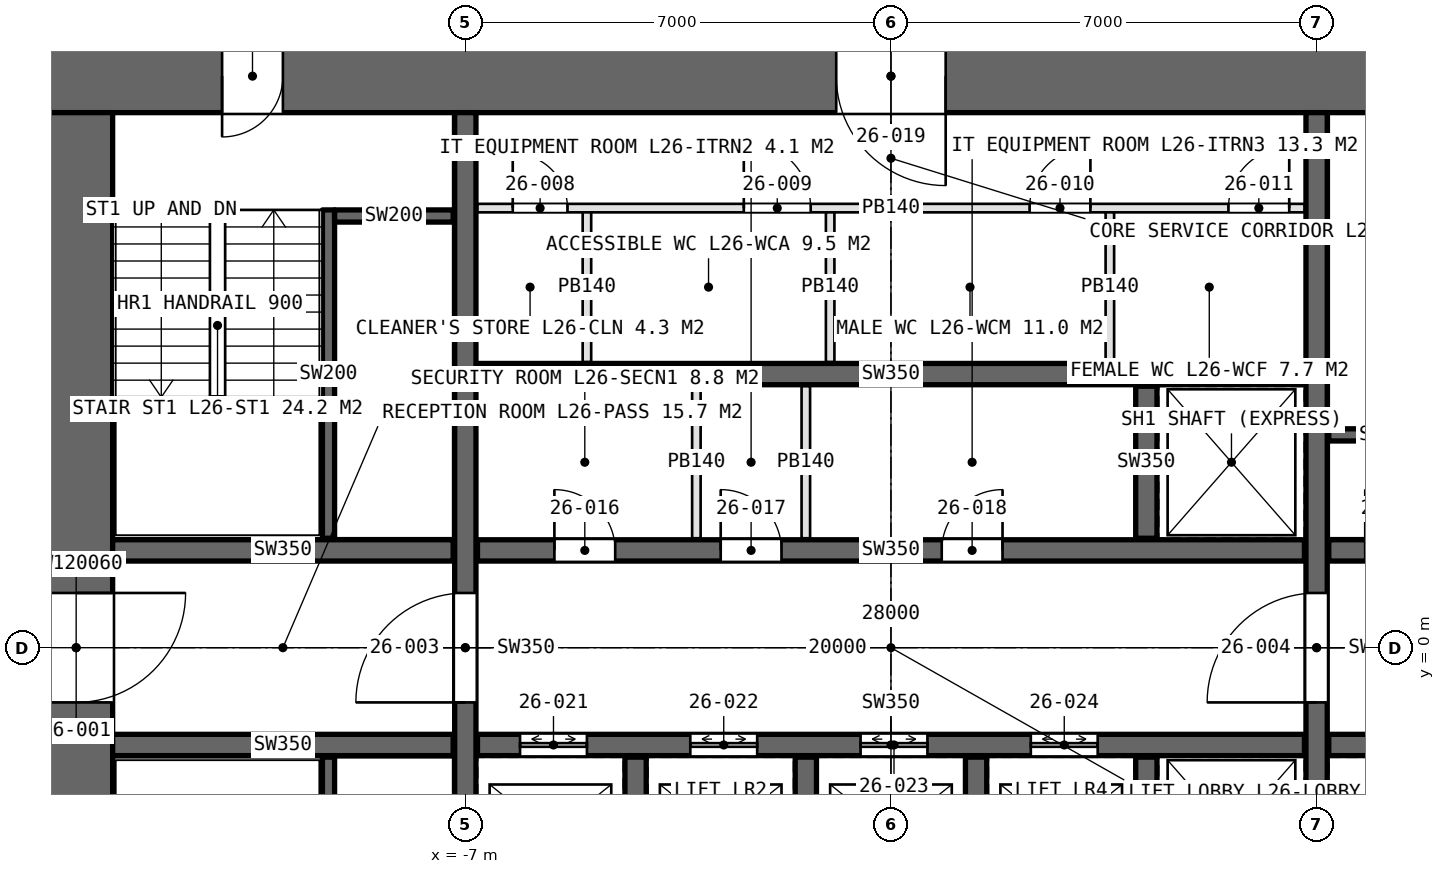
"""IFC4 building model, lengths in metres.
Left out: names, types, materials, properties, quantities, classifications, styles, units other than length and angle.
Written with IfcOpenShell. Run it as: python <this file> out.ifc"""

import sys

from ifc_helpers import new_model, si_unit, direction, frame, frame_2d, origin, place, context, subcontext, project, spatial, rectangle, extrude, element, fill, save


model = new_model("IFC4")
c1 = context("Model", 3, precision=1e-05, world=origin(), true_north=direction((0.0, 1.0)))
c2 = subcontext(c1, "Body", "Model", "MODEL_VIEW")
j1 = project(units=[si_unit("LENGTHUNIT", "METRE"), si_unit("PLANEANGLEUNIT", "RADIAN")], contexts=[c1])
p1 = place(None, origin())
s1 = spatial("IfcSite", under=j1, at=p1, CompositionType="ELEMENT")
p2 = place(p1, origin())
s2 = spatial("IfcBuilding", under=s1, at=p2, CompositionType="ELEMENT")
p3 = place(p2, frame((0.0, 0.0, 126.0)))
s3 = spatial("IfcBuildingStorey", under=s2, at=p3, CompositionType="ELEMENT", Elevation=126.0)
p4 = place(p3, frame((14.0, 9.4, 0.0), z_axis=(0.0, 0.0, 1.0), x_axis=(-1.0, 0.0, 0.0)))
e1 = element("IfcWall", 1, at=p4, inside=s3, PredefinedType="SHEAR", context=c2, shape_type="SweptSolid", body=[
    extrude(rectangle(XDim=28.0, YDim=1.2, at=frame_2d((14.0, 0.0))), origin(), (0.0, 0.0, 1.0), 4.2),
])
p5 = place(p4, frame((24.0, 0.0, 0.0)))
e2 = element("IfcOpeningElement", 2, at=p5, cuts=e1, PredefinedType="OPENING", context=c2, shape_type="SweptSolid", body=[
    extrude(rectangle(XDim=1.0, YDim=2.4, at=frame_2d((0.5, 1.2))), frame((0.0, 0.61, 0.0), z_axis=(0.0, -1.0, 0.0), x_axis=(1.0, 0.0, 0.0)), (0.0, 0.0, 1.0), 1.22),
])
p6 = place(p4, frame((13.1, 0.0, 0.0)))
e3 = element("IfcOpeningElement", 3, at=p6, cuts=e1, PredefinedType="OPENING", context=c2, shape_type="SweptSolid", body=[
    extrude(rectangle(XDim=1.8, YDim=2.4, at=frame_2d((0.9, 1.2))), frame((0.0, 0.61, 0.0), z_axis=(0.0, -1.0, 0.0), x_axis=(1.0, 0.0, 0.0)), (0.0, 0.0, 1.0), 1.22),
])
p7 = place(p3, frame((-13.4, 8.8, 0.0), z_axis=(0.0, 0.0, 1.0), x_axis=(0.0, -1.0, 0.0)))
e4 = element("IfcWall", 4, at=p7, inside=s3, PredefinedType="SHEAR", context=c2, shape_type="SweptSolid", body=[
    extrude(rectangle(XDim=17.6, YDim=1.2, at=frame_2d((8.8, 0.0))), origin(), (0.0, 0.0, 1.0), 4.2),
])
p8 = place(p7, frame((7.9, 0.0, 0.0)))
e5 = element("IfcOpeningElement", 5, at=p8, cuts=e4, PredefinedType="OPENING", context=c2, shape_type="SweptSolid", body=[
    extrude(rectangle(XDim=1.8, YDim=2.4, at=frame_2d((0.9, 1.2))), frame((0.0, 0.61, 0.0), z_axis=(0.0, -1.0, 0.0), x_axis=(1.0, 0.0, 0.0)), (0.0, 0.0, 1.0), 1.22),
])
p9 = place(p7, frame((16.5, 0.0, 0.0)))
e6 = element("IfcOpeningElement", 6, at=p9, cuts=e4, PredefinedType="OPENING", context=c2, shape_type="SweptSolid", body=[
    extrude(rectangle(XDim=1.0, YDim=2.4, at=frame_2d((0.5, 1.2))), frame((0.0, 0.61, 0.0), z_axis=(0.0, -1.0, 0.0), x_axis=(1.0, 0.0, 0.0)), (0.0, 0.0, 1.0), 1.22),
])
p10 = place(p3, frame((-7.0, -8.8, 0.0), z_axis=(0.0, 0.0, 1.0), x_axis=(0.0, 1.0, 0.0)))
e7 = element("IfcWall", 7, at=p10, inside=s3, PredefinedType="SHEAR", context=c2, shape_type="SweptSolid", body=[
    extrude(rectangle(XDim=17.6, YDim=0.35, at=frame_2d((8.8, 0.0))), origin(), (0.0, 0.0, 1.0), 4.2),
])
p11 = place(p10, frame((7.9, 0.0, 0.0)))
e8 = element("IfcOpeningElement", 8, at=p11, cuts=e7, PredefinedType="OPENING", context=c2, shape_type="SweptSolid", body=[
    extrude(rectangle(XDim=1.8, YDim=2.4, at=frame_2d((0.9, 1.2))), frame((0.0, 0.185, 0.0), z_axis=(0.0, -1.0, 0.0), x_axis=(1.0, 0.0, 0.0)), (0.0, 0.0, 1.0), 0.37),
])
p12 = place(p3, frame((7.0, -8.8, 0.0), z_axis=(0.0, 0.0, 1.0), x_axis=(0.0, 1.0, 0.0)))
e9 = element("IfcWall", 9, at=p12, inside=s3, PredefinedType="SHEAR", context=c2, shape_type="SweptSolid", body=[
    extrude(rectangle(XDim=17.6, YDim=0.35, at=frame_2d((8.8, 0.0))), origin(), (0.0, 0.0, 1.0), 4.2),
])
p13 = place(p12, frame((7.9, 0.0, 0.0)))
e10 = element("IfcOpeningElement", 10, at=p13, cuts=e9, PredefinedType="OPENING", context=c2, shape_type="SweptSolid", body=[
    extrude(rectangle(XDim=1.8, YDim=2.4, at=frame_2d((0.9, 1.2))), frame((0.0, 0.185, 0.0), z_axis=(0.0, -1.0, 0.0), x_axis=(1.0, 0.0, 0.0)), (0.0, 0.0, 1.0), 0.37),
])
p14 = place(p3, frame((-6.8, 1.6, 0.0), z_axis=(0.0, 0.0, 1.0), x_axis=(1.0, 0.0, 0.0)))
e11 = element("IfcWall", 11, at=p14, inside=s3, PredefinedType="SHEAR", context=c2, shape_type="SweptSolid", body=[
    extrude(rectangle(XDim=13.6, YDim=0.35, at=frame_2d((6.8, 0.0))), origin(), (0.0, 0.0, 1.0), 4.2),
])
p15 = place(p14, frame((1.265, 0.0, 0.0)))
e12 = element("IfcOpeningElement", 12, at=p15, cuts=e11, PredefinedType="OPENING", context=c2, shape_type="SweptSolid", body=[
    extrude(rectangle(XDim=1.0, YDim=2.4, at=frame_2d((0.5, 1.2))), frame((0.0, 0.185, 0.0), z_axis=(0.0, -1.0, 0.0), x_axis=(1.0, 0.0, 0.0)), (0.0, 0.0, 1.0), 0.37),
])
p16 = place(p14, frame((4.0, 0.0, 0.0)))
e13 = element("IfcOpeningElement", 13, at=p16, cuts=e11, PredefinedType="OPENING", context=c2, shape_type="SweptSolid", body=[
    extrude(rectangle(XDim=1.0, YDim=2.4, at=frame_2d((0.5, 1.2))), frame((0.0, 0.185, 0.0), z_axis=(0.0, -1.0, 0.0), x_axis=(1.0, 0.0, 0.0)), (0.0, 0.0, 1.0), 0.37),
])
p17 = place(p14, frame((7.635, 0.0, 0.0)))
e14 = element("IfcOpeningElement", 14, at=p17, cuts=e11, PredefinedType="OPENING", context=c2, shape_type="SweptSolid", body=[
    extrude(rectangle(XDim=1.0, YDim=2.4, at=frame_2d((0.5, 1.2))), frame((0.0, 0.185, 0.0), z_axis=(0.0, -1.0, 0.0), x_axis=(1.0, 0.0, 0.0)), (0.0, 0.0, 1.0), 0.37),
])
p18 = place(p3, frame((-6.8, -1.6, 0.0), z_axis=(0.0, 0.0, 1.0), x_axis=(1.0, 0.0, 0.0)))
e15 = element("IfcWall", 15, at=p18, inside=s3, PredefinedType="SHEAR", context=c2, shape_type="SweptSolid", body=[
    extrude(rectangle(XDim=13.6, YDim=0.35, at=frame_2d((6.8, 0.0))), origin(), (0.0, 0.0, 1.0), 4.2),
])
p19 = place(p18, frame((0.7, 0.0, 0.0)))
e16 = element("IfcOpeningElement", 16, at=p19, cuts=e15, PredefinedType="OPENING", context=c2, shape_type="SweptSolid", body=[
    extrude(rectangle(XDim=1.1, YDim=2.4, at=frame_2d((0.55, 1.2))), frame((0.0, 0.185, 0.0), z_axis=(0.0, -1.0, 0.0), x_axis=(1.0, 0.0, 0.0)), (0.0, 0.0, 1.0), 0.37),
])
p20 = place(p18, frame((3.5, 0.0, 0.0)))
e17 = element("IfcOpeningElement", 17, at=p20, cuts=e15, PredefinedType="OPENING", context=c2, shape_type="SweptSolid", body=[
    extrude(rectangle(XDim=1.1, YDim=2.4, at=frame_2d((0.55, 1.2))), frame((0.0, 0.185, 0.0), z_axis=(0.0, -1.0, 0.0), x_axis=(1.0, 0.0, 0.0)), (0.0, 0.0, 1.0), 0.37),
])
p21 = place(p18, frame((6.3, 0.0, 0.0)))
e18 = element("IfcOpeningElement", 18, at=p21, cuts=e15, PredefinedType="OPENING", context=c2, shape_type="SweptSolid", body=[
    extrude(rectangle(XDim=1.1, YDim=2.4, at=frame_2d((0.55, 1.2))), frame((0.0, 0.185, 0.0), z_axis=(0.0, -1.0, 0.0), x_axis=(1.0, 0.0, 0.0)), (0.0, 0.0, 1.0), 0.37),
])
p22 = place(p18, frame((9.1, 0.0, 0.0)))
e19 = element("IfcOpeningElement", 19, at=p22, cuts=e15, PredefinedType="OPENING", context=c2, shape_type="SweptSolid", body=[
    extrude(rectangle(XDim=1.1, YDim=2.4, at=frame_2d((0.55, 1.2))), frame((0.0, 0.185, 0.0), z_axis=(0.0, -1.0, 0.0), x_axis=(1.0, 0.0, 0.0)), (0.0, 0.0, 1.0), 0.37),
])
p23 = place(p3, frame((-6.8, 4.5, 0.0), z_axis=(0.0, 0.0, 1.0), x_axis=(1.0, 0.0, 0.0)))
e20 = element("IfcWall", 20, at=p23, inside=s3, PredefinedType="SHEAR", context=c2, shape_type="SweptSolid", body=[
    extrude(rectangle(XDim=13.6, YDim=0.35, at=frame_2d((6.8, 0.0))), origin(), (0.0, 0.0, 1.0), 4.2),
])
for number, where, z_axis, x_axis in (
    (21, (-12.8, 1.6, 0.0), (0.0, 0.0, 1.0), (1.0, 0.0, 0.0)),
    (22, (-12.8, -1.6, 0.0), (0.0, 0.0, 1.0), (1.0, 0.0, 0.0)),
):
    element("IfcWall", number, at=place(p3, frame(where, z_axis=z_axis, x_axis=x_axis)), inside=s3, PredefinedType="SHEAR", context=c2, shape_type="SweptSolid", body=[
        extrude(rectangle(XDim=5.6, YDim=0.35, at=frame_2d((2.8, 0.0))), origin(), (0.0, 0.0, 1.0), 4.2),
    ])
p24 = place(p3, frame((7.2, 1.6, 0.0), z_axis=(0.0, 0.0, 1.0), x_axis=(1.0, 0.0, 0.0)))
e23 = element("IfcWall", 23, at=p24, inside=s3, PredefinedType="SHEAR", context=c2, shape_type="SweptSolid", body=[
    extrude(rectangle(XDim=5.6, YDim=0.35, at=frame_2d((2.8, 0.0))), origin(), (0.0, 0.0, 1.0), 4.2),
])
p25 = place(p24, frame((0.6, 0.0, 0.0)))
e24 = element("IfcOpeningElement", 24, at=p25, cuts=e23, PredefinedType="OPENING", context=c2, shape_type="SweptSolid", body=[
    extrude(rectangle(XDim=1.0, YDim=2.4, at=frame_2d((0.5, 1.2))), frame((0.0, 0.185, 0.0), z_axis=(0.0, -1.0, 0.0), x_axis=(1.0, 0.0, 0.0)), (0.0, 0.0, 1.0), 0.37),
])
p26 = place(p3, frame((7.2, -1.6, 0.0), z_axis=(0.0, 0.0, 1.0), x_axis=(1.0, 0.0, 0.0)))
e25 = element("IfcWall", 25, at=p26, inside=s3, PredefinedType="SHEAR", context=c2, shape_type="SweptSolid", body=[
    extrude(rectangle(XDim=5.6, YDim=0.35, at=frame_2d((2.8, 0.0))), origin(), (0.0, 0.0, 1.0), 4.2),
])
p27 = place(p26, frame((0.9, 0.0, 0.0)))
e26 = element("IfcOpeningElement", 26, at=p27, cuts=e25, PredefinedType="OPENING", context=c2, shape_type="SweptSolid", body=[
    extrude(rectangle(XDim=1.3, YDim=2.4, at=frame_2d((0.65, 1.2))), frame((0.0, 0.185, 0.0), z_axis=(0.0, -1.0, 0.0), x_axis=(1.0, 0.0, 0.0)), (0.0, 0.0, 1.0), 0.37),
])
p28 = place(p26, frame((3.9, 0.0, 0.0)))
e27 = element("IfcOpeningElement", 27, at=p28, cuts=e25, PredefinedType="OPENING", context=c2, shape_type="SweptSolid", body=[
    extrude(rectangle(XDim=1.3, YDim=2.4, at=frame_2d((0.65, 1.2))), frame((0.0, 0.185, 0.0), z_axis=(0.0, -1.0, 0.0), x_axis=(1.0, 0.0, 0.0)), (0.0, 0.0, 1.0), 0.37),
])
for number, where, z_axis, x_axis in (
    (28, (-4.2, -4.3, 0.0), (0.0, 0.0, 1.0), (0.0, 1.0, 0.0)),
    (29, (-1.4, -4.3, 0.0), (0.0, 0.0, 1.0), (0.0, 1.0, 0.0)),
    (30, (1.4, -4.3, 0.0), (0.0, 0.0, 1.0), (0.0, 1.0, 0.0)),
    (31, (4.2, 1.8, 0.0), (0.0, 0.0, 1.0), (0.0, 1.0, 0.0)),
    (32, (4.2, -4.3, 0.0), (0.0, 0.0, 1.0), (0.0, 1.0, 0.0)),
):
    element("IfcWall", number, at=place(p3, frame(where, z_axis=z_axis, x_axis=x_axis)), inside=s3, PredefinedType="SHEAR", context=c2, shape_type="SweptSolid", body=[
        extrude(rectangle(XDim=2.5, YDim=0.35, at=frame_2d((1.25, 0.0))), origin(), (0.0, 0.0, 1.0), 4.2),
    ])
p29 = place(p3, frame((-6.8, 7.23, 0.0), z_axis=(0.0, 0.0, 1.0), x_axis=(1.0, 0.0, 0.0)))
e33 = element("IfcWall", 33, at=p29, inside=s3, PredefinedType="PARTITIONING", context=c2, shape_type="SweptSolid", body=[
    extrude(rectangle(XDim=13.6, YDim=0.14, at=frame_2d((6.8, 0.0))), origin(), (0.0, 0.0, 1.0), 3.95),
])
p30 = place(p29, frame((0.58, 0.0, 0.0)))
e34 = element("IfcOpeningElement", 34, at=p30, cuts=e33, PredefinedType="OPENING", context=c2, shape_type="SweptSolid", body=[
    extrude(rectangle(XDim=0.9, YDim=2.4, at=frame_2d((0.45, 1.2))), frame((0.0, 0.08, 0.0), z_axis=(0.0, -1.0, 0.0), x_axis=(1.0, 0.0, 0.0)), (0.0, 0.0, 1.0), 0.16),
])
p31 = place(p29, frame((4.38, 0.0, 0.0)))
e35 = element("IfcOpeningElement", 35, at=p31, cuts=e33, PredefinedType="OPENING", context=c2, shape_type="SweptSolid", body=[
    extrude(rectangle(XDim=1.1, YDim=2.4, at=frame_2d((0.55, 1.2))), frame((0.0, 0.08, 0.0), z_axis=(0.0, -1.0, 0.0), x_axis=(1.0, 0.0, 0.0)), (0.0, 0.0, 1.0), 0.16),
])
p32 = place(p29, frame((9.08, 0.0, 0.0)))
e36 = element("IfcOpeningElement", 36, at=p32, cuts=e33, PredefinedType="OPENING", context=c2, shape_type="SweptSolid", body=[
    extrude(rectangle(XDim=1.0, YDim=2.4, at=frame_2d((0.5, 1.2))), frame((0.0, 0.08, 0.0), z_axis=(0.0, -1.0, 0.0), x_axis=(1.0, 0.0, 0.0)), (0.0, 0.0, 1.0), 0.16),
])
p33 = place(p29, frame((12.35, 0.0, 0.0)))
e37 = element("IfcOpeningElement", 37, at=p33, cuts=e33, PredefinedType="OPENING", context=c2, shape_type="SweptSolid", body=[
    extrude(rectangle(XDim=1.0, YDim=2.4, at=frame_2d((0.5, 1.2))), frame((0.0, 0.08, 0.0), z_axis=(0.0, -1.0, 0.0), x_axis=(1.0, 0.0, 0.0)), (0.0, 0.0, 1.0), 0.16),
])
for number, where, z_axis, x_axis in (
    (38, (-5.0, 4.7, 0.0), (0.0, 0.0, 1.0), (0.0, 1.0, 0.0)),
    (39, (-1.0, 4.7, 0.0), (0.0, 0.0, 1.0), (0.0, 1.0, 0.0)),
    (40, (3.6, 4.7, 0.0), (0.0, 0.0, 1.0), (0.0, 1.0, 0.0)),
):
    element("IfcWall", number, at=place(p3, frame(where, z_axis=z_axis, x_axis=x_axis)), inside=s3, PredefinedType="PARTITIONING", context=c2, shape_type="SweptSolid", body=[
        extrude(rectangle(XDim=2.46, YDim=0.14, at=frame_2d((1.23, 0.0))), origin(), (0.0, 0.0, 1.0), 3.95),
    ])
for number, where, z_axis, x_axis in (
    (41, (-3.2, 1.8, 0.0), (0.0, 0.0, 1.0), (0.0, 1.0, 0.0)),
    (42, (-1.4, 1.8, 0.0), (0.0, 0.0, 1.0), (0.0, 1.0, 0.0)),
):
    element("IfcWall", number, at=place(p3, frame(where, z_axis=z_axis, x_axis=x_axis)), inside=s3, PredefinedType="PARTITIONING", context=c2, shape_type="SweptSolid", body=[
        extrude(rectangle(XDim=2.5, YDim=0.14, at=frame_2d((1.25, 0.0))), origin(), (0.0, 0.0, 1.0), 3.95),
    ])
p34 = place(p3, frame((-9.25, 7.2, 0.0), z_axis=(0.0, 0.0, 1.0), x_axis=(0.0, -1.0, 0.0)))
e43 = element("IfcWall", 43, at=p34, inside=s3, PredefinedType="SOLIDWALL", context=c2, shape_type="SweptSolid", body=[
    extrude(rectangle(XDim=5.4, YDim=0.2, at=frame_2d((2.7, 0.0))), origin(), (0.0, 0.0, 1.0), 4.2),
])
p35 = place(p3, frame((-9.15, 7.1, 0.0), z_axis=(0.0, 0.0, 1.0), x_axis=(1.0, 0.0, 0.0)))
e44 = element("IfcWall", 44, at=p35, inside=s3, PredefinedType="SOLIDWALL", context=c2, shape_type="SweptSolid", body=[
    extrude(rectangle(XDim=1.95, YDim=0.2, at=frame_2d((0.975, 0.0))), origin(), (0.0, 0.0, 1.0), 4.2),
])
p36 = place(p3, frame((-9.25, -7.2, 0.0), z_axis=(0.0, 0.0, 1.0), x_axis=(0.0, 1.0, 0.0)))
e45 = element("IfcWall", 45, at=p36, inside=s3, PredefinedType="SOLIDWALL", context=c2, shape_type="SweptSolid", body=[
    extrude(rectangle(XDim=5.4, YDim=0.2, at=frame_2d((2.7, 0.0))), origin(), (0.0, 0.0, 1.0), 4.2),
])
p37 = place(p3, frame((9.15, 3.5, 0.0), z_axis=(0.0, 0.0, 1.0), x_axis=(-1.0, 0.0, 0.0)))
e46 = element("IfcWall", 46, at=p37, inside=s3, PredefinedType="SOLIDWALL", context=c2, shape_type="SweptSolid", body=[
    extrude(rectangle(XDim=1.95, YDim=0.2, at=frame_2d((0.975, 0.0))), origin(), (0.0, 0.0, 1.0), 4.2),
])
p38 = place(p8, origin())
e47 = element("IfcDoor", 47, at=p38, inside=s3, OperationType="DOUBLE_DOOR_SINGLE_SWING", PredefinedType="DOOR", context=c2, shape_type="SweptSolid", body=[
    extrude(rectangle(XDim=1.8, YDim=2.4, at=frame_2d((0.9, 1.2))), frame((0.0, 0.025, 0.0), z_axis=(0.0, -1.0, 0.0), x_axis=(1.0, 0.0, 0.0)), (0.0, 0.0, 1.0), 0.05),
])
fill(e5, e47)
p39 = place(p11, origin())
e48 = element("IfcDoor", 48, at=p39, inside=s3, OperationType="DOUBLE_DOOR_SINGLE_SWING", PredefinedType="DOOR", context=c2, shape_type="SweptSolid", body=[
    extrude(rectangle(XDim=1.8, YDim=2.4, at=frame_2d((0.9, 1.2))), frame((0.0, 0.025, 0.0), z_axis=(0.0, -1.0, 0.0), x_axis=(1.0, 0.0, 0.0)), (0.0, 0.0, 1.0), 0.05),
])
fill(e8, e48)
p40 = place(p13, origin())
e49 = element("IfcDoor", 49, at=p40, inside=s3, OperationType="DOUBLE_DOOR_SINGLE_SWING", PredefinedType="DOOR", context=c2, shape_type="SweptSolid", body=[
    extrude(rectangle(XDim=1.8, YDim=2.4, at=frame_2d((0.9, 1.2))), frame((0.0, 0.025, 0.0), z_axis=(0.0, -1.0, 0.0), x_axis=(1.0, 0.0, 0.0)), (0.0, 0.0, 1.0), 0.05),
])
fill(e10, e49)
p41 = place(p5, origin())
e50 = element("IfcDoor", 50, at=p41, inside=s3, OperationType="SINGLE_SWING_RIGHT", PredefinedType="DOOR", context=c2, shape_type="SweptSolid", body=[
    extrude(rectangle(XDim=1.0, YDim=2.4, at=frame_2d((0.5, 1.2))), frame((0.0, 0.025, 0.0), z_axis=(0.0, -1.0, 0.0), x_axis=(1.0, 0.0, 0.0)), (0.0, 0.0, 1.0), 0.05),
])
fill(e2, e50)
p42 = place(p30, origin())
e51 = element("IfcDoor", 51, at=p42, inside=s3, OperationType="SINGLE_SWING_LEFT", PredefinedType="DOOR", context=c2, shape_type="SweptSolid", body=[
    extrude(rectangle(XDim=0.9, YDim=2.4, at=frame_2d((0.45, 1.2))), frame((0.0, 0.025, 0.0), z_axis=(0.0, -1.0, 0.0), x_axis=(1.0, 0.0, 0.0)), (0.0, 0.0, 1.0), 0.05),
])
fill(e34, e51)
p43 = place(p31, origin())
e52 = element("IfcDoor", 52, at=p43, inside=s3, OperationType="SINGLE_SWING_LEFT", PredefinedType="DOOR", context=c2, shape_type="SweptSolid", body=[
    extrude(rectangle(XDim=1.1, YDim=2.4, at=frame_2d((0.55, 1.2))), frame((0.0, 0.025, 0.0), z_axis=(0.0, -1.0, 0.0), x_axis=(1.0, 0.0, 0.0)), (0.0, 0.0, 1.0), 0.05),
])
fill(e35, e52)
p44 = place(p32, origin())
e53 = element("IfcDoor", 53, at=p44, inside=s3, OperationType="SINGLE_SWING_RIGHT", PredefinedType="DOOR", context=c2, shape_type="SweptSolid", body=[
    extrude(rectangle(XDim=1.0, YDim=2.4, at=frame_2d((0.5, 1.2))), frame((0.0, 0.025, 0.0), z_axis=(0.0, -1.0, 0.0), x_axis=(1.0, 0.0, 0.0)), (0.0, 0.0, 1.0), 0.05),
])
fill(e36, e53)
p45 = place(p33, origin())
e54 = element("IfcDoor", 54, at=p45, inside=s3, OperationType="SINGLE_SWING_RIGHT", PredefinedType="DOOR", context=c2, shape_type="SweptSolid", body=[
    extrude(rectangle(XDim=1.0, YDim=2.4, at=frame_2d((0.5, 1.2))), frame((0.0, 0.025, 0.0), z_axis=(0.0, -1.0, 0.0), x_axis=(1.0, 0.0, 0.0)), (0.0, 0.0, 1.0), 0.05),
])
fill(e37, e54)
p46 = place(p15, origin())
e55 = element("IfcDoor", 55, at=p46, inside=s3, OperationType="SINGLE_SWING_LEFT", PredefinedType="DOOR", context=c2, shape_type="SweptSolid", body=[
    extrude(rectangle(XDim=1.0, YDim=2.4, at=frame_2d((0.5, 1.2))), frame((0.0, 0.025, 0.0), z_axis=(0.0, -1.0, 0.0), x_axis=(1.0, 0.0, 0.0)), (0.0, 0.0, 1.0), 0.05),
])
fill(e12, e55)
p47 = place(p16, origin())
e56 = element("IfcDoor", 56, at=p47, inside=s3, OperationType="SINGLE_SWING_LEFT", PredefinedType="DOOR", context=c2, shape_type="SweptSolid", body=[
    extrude(rectangle(XDim=1.0, YDim=2.4, at=frame_2d((0.5, 1.2))), frame((0.0, 0.025, 0.0), z_axis=(0.0, -1.0, 0.0), x_axis=(1.0, 0.0, 0.0)), (0.0, 0.0, 1.0), 0.05),
])
fill(e13, e56)
p48 = place(p17, origin())
e57 = element("IfcDoor", 57, at=p48, inside=s3, OperationType="SINGLE_SWING_RIGHT", PredefinedType="DOOR", context=c2, shape_type="SweptSolid", body=[
    extrude(rectangle(XDim=1.0, YDim=2.4, at=frame_2d((0.5, 1.2))), frame((0.0, 0.025, 0.0), z_axis=(0.0, -1.0, 0.0), x_axis=(1.0, 0.0, 0.0)), (0.0, 0.0, 1.0), 0.05),
])
fill(e14, e57)
p49 = place(p6, origin())
e58 = element("IfcDoor", 58, at=p49, inside=s3, OperationType="DOUBLE_DOOR_SINGLE_SWING", PredefinedType="DOOR", context=c2, shape_type="SweptSolid", body=[
    extrude(rectangle(XDim=1.8, YDim=2.4, at=frame_2d((0.9, 1.2))), frame((0.0, 0.025, 0.0), z_axis=(0.0, -1.0, 0.0), x_axis=(1.0, 0.0, 0.0)), (0.0, 0.0, 1.0), 0.05),
])
fill(e3, e58)
p50 = place(p19, origin())
e59 = element("IfcDoor", 59, at=p50, inside=s3, OperationType="DOUBLE_DOOR_SLIDING", PredefinedType="DOOR", context=c2, shape_type="SweptSolid", body=[
    extrude(rectangle(XDim=1.1, YDim=2.4, at=frame_2d((0.55, 1.2))), frame((0.0, 0.025, 0.0), z_axis=(0.0, -1.0, 0.0), x_axis=(1.0, 0.0, 0.0)), (0.0, 0.0, 1.0), 0.05),
])
fill(e16, e59)
p51 = place(p20, origin())
e60 = element("IfcDoor", 60, at=p51, inside=s3, OperationType="DOUBLE_DOOR_SLIDING", PredefinedType="DOOR", context=c2, shape_type="SweptSolid", body=[
    extrude(rectangle(XDim=1.1, YDim=2.4, at=frame_2d((0.55, 1.2))), frame((0.0, 0.025, 0.0), z_axis=(0.0, -1.0, 0.0), x_axis=(1.0, 0.0, 0.0)), (0.0, 0.0, 1.0), 0.05),
])
fill(e17, e60)
p52 = place(p21, origin())
e61 = element("IfcDoor", 61, at=p52, inside=s3, OperationType="DOUBLE_DOOR_SLIDING", PredefinedType="DOOR", context=c2, shape_type="SweptSolid", body=[
    extrude(rectangle(XDim=1.1, YDim=2.4, at=frame_2d((0.55, 1.2))), frame((0.0, 0.025, 0.0), z_axis=(0.0, -1.0, 0.0), x_axis=(1.0, 0.0, 0.0)), (0.0, 0.0, 1.0), 0.05),
])
fill(e18, e61)
p53 = place(p22, origin())
e62 = element("IfcDoor", 62, at=p53, inside=s3, OperationType="DOUBLE_DOOR_SLIDING", PredefinedType="DOOR", context=c2, shape_type="SweptSolid", body=[
    extrude(rectangle(XDim=1.1, YDim=2.4, at=frame_2d((0.55, 1.2))), frame((0.0, 0.025, 0.0), z_axis=(0.0, -1.0, 0.0), x_axis=(1.0, 0.0, 0.0)), (0.0, 0.0, 1.0), 0.05),
])
fill(e19, e62)
save(model, sys.argv[1])
